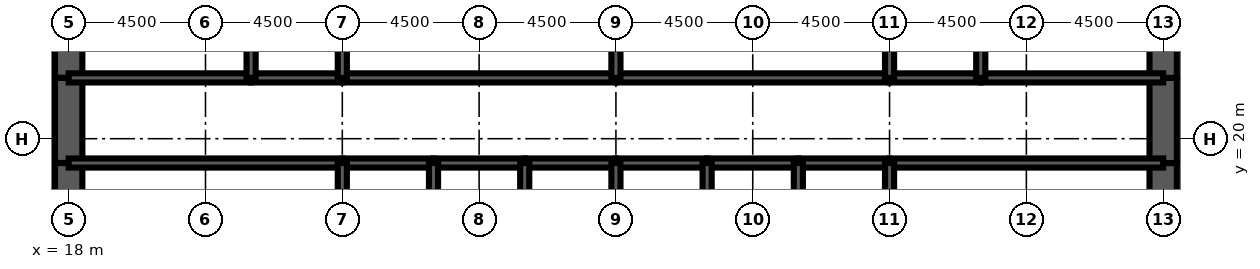
"""IFC4 building model, lengths in metres.
Left out: names, types, materials, properties, quantities, classifications, styles, units other than length and angle.
Written with IfcOpenShell. Run it as: python <this file> out.ifc"""

import sys

from ifc_helpers import new_model, si_unit, direction, frame, frame_2d, origin, place, context, subcontext, project, spatial, rectangle, extrude, element, fill, save


model = new_model("IFC4")
c1 = context("Model", 3, precision=1e-05, world=origin(), true_north=direction((0.0, 1.0)))
c2 = subcontext(c1, "Body", "Model", "MODEL_VIEW")
j1 = project(units=[si_unit("LENGTHUNIT", "METRE"), si_unit("PLANEANGLEUNIT", "RADIAN")], contexts=[c1])
p1 = place(None, origin())
s1 = spatial("IfcSite", under=j1, at=p1, CompositionType="ELEMENT")
p2 = place(p1, origin())
s2 = spatial("IfcBuilding", under=s1, at=p2, CompositionType="ELEMENT")
p3 = place(p2, frame((0.0, 0.0, 59.0)))
s3 = spatial("IfcBuildingStorey", under=s2, at=p3, CompositionType="ELEMENT", Elevation=59.0)
p4 = place(p3, frame((18.0, 26.0, 0.0), z_axis=(0.0, 0.0, 1.0), x_axis=(0.0, -1.0, 0.0)))
e1 = element("IfcWall", 1, at=p4, inside=s3, PredefinedType="SHEAR", context=c2, shape_type="SweptSolid", body=[
    extrude(rectangle(XDim=4.0, YDim=0.9, at=frame_2d((2.0, 0.0))), origin(), (0.0, 0.0, 1.0), 4.5),
])
p5 = place(p3, frame((18.0, 22.0, 0.0), z_axis=(0.0, 0.0, 1.0), x_axis=(0.0, -1.0, 0.0)))
e2 = element("IfcWall", 2, at=p5, inside=s3, PredefinedType="SHEAR", context=c2, shape_type="SweptSolid", body=[
    extrude(rectangle(XDim=2.8, YDim=0.9, at=frame_2d((1.4, 0.0))), origin(), (0.0, 0.0, 1.0), 4.5),
])
p6 = place(p5, frame((0.6, 0.0, 0.0)))
e3 = element("IfcOpeningElement", 3, at=p6, cuts=e2, PredefinedType="OPENING", context=c2, shape_type="SweptSolid", body=[
    extrude(rectangle(XDim=1.8, YDim=2.1, at=frame_2d((0.9, 1.05))), frame((0.0, 0.46, 0.0), z_axis=(0.0, -1.0, 0.0), x_axis=(1.0, 0.0, 0.0)), (0.0, 0.0, 1.0), 0.92),
])
for number, where, z_axis, x_axis in (
    (4, (18.0, 19.2, 0.0), (0.0, 0.0, 1.0), (0.0, -1.0, 0.0)),
    (5, (54.0, 16.0, 0.0), (0.0, 0.0, 1.0), (0.0, 1.0, 0.0)),
):
    element("IfcWall", number, at=place(p3, frame(where, z_axis=z_axis, x_axis=x_axis)), inside=s3, PredefinedType="SHEAR", context=c2, shape_type="SweptSolid", body=[
        extrude(rectangle(XDim=3.2, YDim=0.9, at=frame_2d((1.6, 0.0))), origin(), (0.0, 0.0, 1.0), 4.5),
    ])
p7 = place(p3, frame((54.0, 19.2, 0.0), z_axis=(0.0, 0.0, 1.0), x_axis=(0.0, 1.0, 0.0)))
e6 = element("IfcWall", 6, at=p7, inside=s3, PredefinedType="SHEAR", context=c2, shape_type="SweptSolid", body=[
    extrude(rectangle(XDim=2.8, YDim=0.9, at=frame_2d((1.4, 0.0))), origin(), (0.0, 0.0, 1.0), 4.5),
])
p8 = place(p7, frame((0.4, 0.0, 0.0)))
e7 = element("IfcOpeningElement", 7, at=p8, cuts=e6, PredefinedType="OPENING", context=c2, shape_type="SweptSolid", body=[
    extrude(rectangle(XDim=1.8, YDim=2.1, at=frame_2d((0.9, 1.05))), frame((0.0, 0.46, 0.0), z_axis=(0.0, -1.0, 0.0), x_axis=(1.0, 0.0, 0.0)), (0.0, 0.0, 1.0), 0.92),
])
p9 = place(p3, frame((54.0, 22.0, 0.0), z_axis=(0.0, 0.0, 1.0), x_axis=(0.0, 1.0, 0.0)))
e8 = element("IfcWall", 8, at=p9, inside=s3, PredefinedType="SHEAR", context=c2, shape_type="SweptSolid", body=[
    extrude(rectangle(XDim=4.0, YDim=0.9, at=frame_2d((2.0, 0.0))), origin(), (0.0, 0.0, 1.0), 4.5),
])
p10 = place(p3, frame((18.0, 19.2, 0.0), z_axis=(0.0, 0.0, 1.0), x_axis=(1.0, 0.0, 0.0)))
e9 = element("IfcWall", 9, at=p10, inside=s3, PredefinedType="SOLIDWALL", context=c2, shape_type="SweptSolid", body=[
    extrude(rectangle(XDim=9.0, YDim=0.3, at=frame_2d((4.5, 0.0))), origin(), (0.0, 0.0, 1.0), 4.5),
])
p11 = place(p10, frame((0.65, 0.0, 0.0)))
e10 = element("IfcOpeningElement", 10, at=p11, cuts=e9, PredefinedType="OPENING", context=c2, shape_type="SweptSolid", body=[
    extrude(rectangle(XDim=1.0, YDim=2.1, at=frame_2d((0.5, 1.05))), frame((0.0, 0.16, 0.0), z_axis=(0.0, -1.0, 0.0), x_axis=(1.0, 0.0, 0.0)), (0.0, 0.0, 1.0), 0.32),
])
p12 = place(p3, frame((27.0, 19.2, 0.0), z_axis=(0.0, 0.0, 1.0), x_axis=(1.0, 0.0, 0.0)))
e11 = element("IfcWall", 11, at=p12, inside=s3, PredefinedType="SOLIDWALL", context=c2, shape_type="SweptSolid", body=[
    extrude(rectangle(XDim=3.0, YDim=0.3, at=frame_2d((1.5, 0.0))), origin(), (0.0, 0.0, 1.0), 4.5),
])
p13 = place(p12, frame((0.95, 0.0, 0.0)))
e12 = element("IfcOpeningElement", 12, at=p13, cuts=e11, PredefinedType="OPENING", context=c2, shape_type="SweptSolid", body=[
    extrude(rectangle(XDim=1.1, YDim=2.2, at=frame_2d((0.55, 1.1))), frame((0.0, 0.16, 0.0), z_axis=(0.0, -1.0, 0.0), x_axis=(1.0, 0.0, 0.0)), (0.0, 0.0, 1.0), 0.32),
])
p14 = place(p3, frame((30.0, 19.2, 0.0), z_axis=(0.0, 0.0, 1.0), x_axis=(1.0, 0.0, 0.0)))
e13 = element("IfcWall", 13, at=p14, inside=s3, PredefinedType="SOLIDWALL", context=c2, shape_type="SweptSolid", body=[
    extrude(rectangle(XDim=3.0, YDim=0.3, at=frame_2d((1.5, 0.0))), origin(), (0.0, 0.0, 1.0), 4.5),
])
p15 = place(p14, frame((0.95, 0.0, 0.0)))
e14 = element("IfcOpeningElement", 14, at=p15, cuts=e13, PredefinedType="OPENING", context=c2, shape_type="SweptSolid", body=[
    extrude(rectangle(XDim=1.1, YDim=2.2, at=frame_2d((0.55, 1.1))), frame((0.0, 0.16, 0.0), z_axis=(0.0, -1.0, 0.0), x_axis=(1.0, 0.0, 0.0)), (0.0, 0.0, 1.0), 0.32),
])
p16 = place(p3, frame((33.0, 19.2, 0.0), z_axis=(0.0, 0.0, 1.0), x_axis=(1.0, 0.0, 0.0)))
e15 = element("IfcWall", 15, at=p16, inside=s3, PredefinedType="SOLIDWALL", context=c2, shape_type="SweptSolid", body=[
    extrude(rectangle(XDim=3.0, YDim=0.3, at=frame_2d((1.5, 0.0))), origin(), (0.0, 0.0, 1.0), 4.5),
])
p17 = place(p16, frame((0.95, 0.0, 0.0)))
e16 = element("IfcOpeningElement", 16, at=p17, cuts=e15, PredefinedType="OPENING", context=c2, shape_type="SweptSolid", body=[
    extrude(rectangle(XDim=1.1, YDim=2.2, at=frame_2d((0.55, 1.1))), frame((0.0, 0.16, 0.0), z_axis=(0.0, -1.0, 0.0), x_axis=(1.0, 0.0, 0.0)), (0.0, 0.0, 1.0), 0.32),
])
p18 = place(p3, frame((36.0, 19.2, 0.0), z_axis=(0.0, 0.0, 1.0), x_axis=(1.0, 0.0, 0.0)))
e17 = element("IfcWall", 17, at=p18, inside=s3, PredefinedType="SOLIDWALL", context=c2, shape_type="SweptSolid", body=[
    extrude(rectangle(XDim=3.0, YDim=0.3, at=frame_2d((1.5, 0.0))), origin(), (0.0, 0.0, 1.0), 4.5),
])
p19 = place(p18, frame((0.95, 0.0, 0.0)))
e18 = element("IfcOpeningElement", 18, at=p19, cuts=e17, PredefinedType="OPENING", context=c2, shape_type="SweptSolid", body=[
    extrude(rectangle(XDim=1.1, YDim=2.2, at=frame_2d((0.55, 1.1))), frame((0.0, 0.16, 0.0), z_axis=(0.0, -1.0, 0.0), x_axis=(1.0, 0.0, 0.0)), (0.0, 0.0, 1.0), 0.32),
])
for number, where, z_axis, x_axis in (
    (19, (39.0, 19.2, 0.0), (0.0, 0.0, 1.0), (1.0, 0.0, 0.0)),
    (20, (42.0, 19.2, 0.0), (0.0, 0.0, 1.0), (1.0, 0.0, 0.0)),
):
    element("IfcWall", number, at=place(p3, frame(where, z_axis=z_axis, x_axis=x_axis)), inside=s3, PredefinedType="SOLIDWALL", context=c2, shape_type="SweptSolid", body=[
        extrude(rectangle(XDim=3.0, YDim=0.3, at=frame_2d((1.5, 0.0))), origin(), (0.0, 0.0, 1.0), 4.5),
    ])
p20 = place(p3, frame((45.0, 19.2, 0.0), z_axis=(0.0, 0.0, 1.0), x_axis=(1.0, 0.0, 0.0)))
e21 = element("IfcWall", 21, at=p20, inside=s3, PredefinedType="SOLIDWALL", context=c2, shape_type="SweptSolid", body=[
    extrude(rectangle(XDim=9.0, YDim=0.3, at=frame_2d((4.5, 0.0))), origin(), (0.0, 0.0, 1.0), 4.5),
])
p21 = place(p20, frame((7.35, 0.0, 0.0)))
e22 = element("IfcOpeningElement", 22, at=p21, cuts=e21, PredefinedType="OPENING", context=c2, shape_type="SweptSolid", body=[
    extrude(rectangle(XDim=1.0, YDim=2.1, at=frame_2d((0.5, 1.05))), frame((0.0, 0.16, 0.0), z_axis=(0.0, -1.0, 0.0), x_axis=(1.0, 0.0, 0.0)), (0.0, 0.0, 1.0), 0.32),
])
p22 = place(p3, frame((18.0, 22.0, 0.0), z_axis=(0.0, 0.0, 1.0), x_axis=(1.0, 0.0, 0.0)))
e23 = element("IfcWall", 23, at=p22, inside=s3, PredefinedType="SOLIDWALL", context=c2, shape_type="SweptSolid", body=[
    extrude(rectangle(XDim=6.0, YDim=0.3, at=frame_2d((3.0, 0.0))), origin(), (0.0, 0.0, 1.0), 4.5),
])
p23 = place(p22, frame((4.4, 0.0, 0.0)))
e24 = element("IfcOpeningElement", 24, at=p23, cuts=e23, PredefinedType="OPENING", context=c2, shape_type="SweptSolid", body=[
    extrude(rectangle(XDim=1.0, YDim=2.1, at=frame_2d((0.5, 1.05))), frame((0.0, 0.16, 0.0), z_axis=(0.0, -1.0, 0.0), x_axis=(1.0, 0.0, 0.0)), (0.0, 0.0, 1.0), 0.32),
])
p24 = place(p22, frame((1.0, 0.0, 0.0)))
e25 = element("IfcOpeningElement", 25, at=p24, cuts=e23, PredefinedType="OPENING", context=c2, shape_type="SweptSolid", body=[
    extrude(rectangle(XDim=1.0, YDim=2.1, at=frame_2d((0.5, 1.05))), frame((0.0, 0.16, 0.0), z_axis=(0.0, -1.0, 0.0), x_axis=(1.0, 0.0, 0.0)), (0.0, 0.0, 1.0), 0.32),
])
p25 = place(p3, frame((24.0, 22.0, 0.0), z_axis=(0.0, 0.0, 1.0), x_axis=(1.0, 0.0, 0.0)))
e26 = element("IfcWall", 26, at=p25, inside=s3, PredefinedType="SOLIDWALL", context=c2, shape_type="SweptSolid", body=[
    extrude(rectangle(XDim=3.0, YDim=0.3, at=frame_2d((1.5, 0.0))), origin(), (0.0, 0.0, 1.0), 4.5),
])
p26 = place(p25, frame((1.0, 0.0, 0.0)))
e27 = element("IfcOpeningElement", 27, at=p26, cuts=e26, PredefinedType="OPENING", context=c2, shape_type="SweptSolid", body=[
    extrude(rectangle(XDim=1.0, YDim=2.1, at=frame_2d((0.5, 1.05))), frame((0.0, 0.16, 0.0), z_axis=(0.0, -1.0, 0.0), x_axis=(1.0, 0.0, 0.0)), (0.0, 0.0, 1.0), 0.32),
])
p27 = place(p3, frame((27.0, 22.0, 0.0), z_axis=(0.0, 0.0, 1.0), x_axis=(1.0, 0.0, 0.0)))
e28 = element("IfcWall", 28, at=p27, inside=s3, PredefinedType="SOLIDWALL", context=c2, shape_type="SweptSolid", body=[
    extrude(rectangle(XDim=9.0, YDim=0.3, at=frame_2d((4.5, 0.0))), origin(), (0.0, 0.0, 1.0), 4.5),
])
p28 = place(p27, frame((4.0, 0.0, 0.0)))
e29 = element("IfcOpeningElement", 29, at=p28, cuts=e28, PredefinedType="OPENING", context=c2, shape_type="SweptSolid", body=[
    extrude(rectangle(XDim=1.0, YDim=2.1, at=frame_2d((0.5, 1.05))), frame((0.0, 0.16, 0.0), z_axis=(0.0, -1.0, 0.0), x_axis=(1.0, 0.0, 0.0)), (0.0, 0.0, 1.0), 0.32),
])
p29 = place(p3, frame((36.0, 22.0, 0.0), z_axis=(0.0, 0.0, 1.0), x_axis=(1.0, 0.0, 0.0)))
e30 = element("IfcWall", 30, at=p29, inside=s3, PredefinedType="SOLIDWALL", context=c2, shape_type="SweptSolid", body=[
    extrude(rectangle(XDim=9.0, YDim=0.3, at=frame_2d((4.5, 0.0))), origin(), (0.0, 0.0, 1.0), 4.5),
])
p30 = place(p29, frame((4.0, 0.0, 0.0)))
e31 = element("IfcOpeningElement", 31, at=p30, cuts=e30, PredefinedType="OPENING", context=c2, shape_type="SweptSolid", body=[
    extrude(rectangle(XDim=1.0, YDim=2.1, at=frame_2d((0.5, 1.05))), frame((0.0, 0.16, 0.0), z_axis=(0.0, -1.0, 0.0), x_axis=(1.0, 0.0, 0.0)), (0.0, 0.0, 1.0), 0.32),
])
p31 = place(p3, frame((45.0, 22.0, 0.0), z_axis=(0.0, 0.0, 1.0), x_axis=(1.0, 0.0, 0.0)))
e32 = element("IfcWall", 32, at=p31, inside=s3, PredefinedType="SOLIDWALL", context=c2, shape_type="SweptSolid", body=[
    extrude(rectangle(XDim=3.0, YDim=0.3, at=frame_2d((1.5, 0.0))), origin(), (0.0, 0.0, 1.0), 4.5),
])
p32 = place(p31, frame((1.0, 0.0, 0.0)))
e33 = element("IfcOpeningElement", 33, at=p32, cuts=e32, PredefinedType="OPENING", context=c2, shape_type="SweptSolid", body=[
    extrude(rectangle(XDim=1.0, YDim=2.1, at=frame_2d((0.5, 1.05))), frame((0.0, 0.16, 0.0), z_axis=(0.0, -1.0, 0.0), x_axis=(1.0, 0.0, 0.0)), (0.0, 0.0, 1.0), 0.32),
])
p33 = place(p3, frame((48.0, 22.0, 0.0), z_axis=(0.0, 0.0, 1.0), x_axis=(1.0, 0.0, 0.0)))
e34 = element("IfcWall", 34, at=p33, inside=s3, PredefinedType="SOLIDWALL", context=c2, shape_type="SweptSolid", body=[
    extrude(rectangle(XDim=6.0, YDim=0.3, at=frame_2d((3.0, 0.0))), origin(), (0.0, 0.0, 1.0), 4.5),
])
p34 = place(p33, frame((2.0, 0.0, 0.0)))
e35 = element("IfcOpeningElement", 35, at=p34, cuts=e34, PredefinedType="OPENING", context=c2, shape_type="SweptSolid", body=[
    extrude(rectangle(XDim=1.0, YDim=2.1, at=frame_2d((0.5, 1.05))), frame((0.0, 0.16, 0.0), z_axis=(0.0, -1.0, 0.0), x_axis=(1.0, 0.0, 0.0)), (0.0, 0.0, 1.0), 0.32),
])
p35 = place(p33, frame((4.15, 0.0, 0.0)))
e36 = element("IfcOpeningElement", 36, at=p35, cuts=e34, PredefinedType="OPENING", context=c2, shape_type="SweptSolid", body=[
    extrude(rectangle(XDim=1.0, YDim=2.1, at=frame_2d((0.5, 1.05))), frame((0.0, 0.16, 0.0), z_axis=(0.0, -1.0, 0.0), x_axis=(1.0, 0.0, 0.0)), (0.0, 0.0, 1.0), 0.32),
])
for number, where, z_axis, x_axis in (
    (37, (27.0, 16.0, 0.0), (0.0, 0.0, 1.0), (0.0, 1.0, 0.0)),
    (38, (30.0, 16.0, 0.0), (0.0, 0.0, 1.0), (0.0, 1.0, 0.0)),
    (39, (33.0, 16.0, 0.0), (0.0, 0.0, 1.0), (0.0, 1.0, 0.0)),
    (40, (36.0, 16.0, 0.0), (0.0, 0.0, 1.0), (0.0, 1.0, 0.0)),
    (41, (39.0, 16.0, 0.0), (0.0, 0.0, 1.0), (0.0, 1.0, 0.0)),
    (42, (42.0, 16.0, 0.0), (0.0, 0.0, 1.0), (0.0, 1.0, 0.0)),
    (43, (45.0, 16.0, 0.0), (0.0, 0.0, 1.0), (0.0, 1.0, 0.0)),
):
    element("IfcWall", number, at=place(p3, frame(where, z_axis=z_axis, x_axis=x_axis)), inside=s3, PredefinedType="SOLIDWALL", context=c2, shape_type="SweptSolid", body=[
        extrude(rectangle(XDim=3.2, YDim=0.3, at=frame_2d((1.6, 0.0))), origin(), (0.0, 0.0, 1.0), 4.5),
    ])
for number, where, z_axis, x_axis in (
    (44, (24.0, 22.0, 0.0), (0.0, 0.0, 1.0), (0.0, 1.0, 0.0)),
    (45, (27.0, 22.0, 0.0), (0.0, 0.0, 1.0), (0.0, 1.0, 0.0)),
    (46, (36.0, 22.0, 0.0), (0.0, 0.0, 1.0), (0.0, 1.0, 0.0)),
    (47, (45.0, 22.0, 0.0), (0.0, 0.0, 1.0), (0.0, 1.0, 0.0)),
    (48, (48.0, 22.0, 0.0), (0.0, 0.0, 1.0), (0.0, 1.0, 0.0)),
):
    element("IfcWall", number, at=place(p3, frame(where, z_axis=z_axis, x_axis=x_axis)), inside=s3, PredefinedType="SOLIDWALL", context=c2, shape_type="SweptSolid", body=[
        extrude(rectangle(XDim=4.0, YDim=0.3, at=frame_2d((2.0, 0.0))), origin(), (0.0, 0.0, 1.0), 4.5),
    ])
p36 = place(p3, frame((39.0, 22.15, 0.0), z_axis=(0.0, 0.0, 1.0), x_axis=(0.0, 1.0, 0.0)))
e49 = element("IfcWall", 49, at=p36, inside=s3, PredefinedType="PARTITIONING", context=c2, shape_type="SweptSolid", body=[
    extrude(rectangle(XDim=3.7, YDim=0.15, at=frame_2d((1.85, 0.0))), origin(), (0.0, 0.0, 1.0), 3.0),
])
p37 = place(p36, frame((2.2, 0.0, 0.0)))
e50 = element("IfcOpeningElement", 50, at=p37, cuts=e49, PredefinedType="OPENING", context=c2, shape_type="SweptSolid", body=[
    extrude(rectangle(XDim=1.0, YDim=2.1, at=frame_2d((0.5, 1.05))), frame((0.0, 0.085, 0.0), z_axis=(0.0, -1.0, 0.0), x_axis=(1.0, 0.0, 0.0)), (0.0, 0.0, 1.0), 0.17),
])
for number, where, z_axis, x_axis in (
    (51, (20.625, 22.15, 0.0), (0.0, 0.0, 1.0), (0.0, 1.0, 0.0)),
    (52, (51.675, 22.15, 0.0), (0.0, 0.0, 1.0), (0.0, 1.0, 0.0)),
):
    element("IfcWall", number, at=place(p3, frame(where, z_axis=z_axis, x_axis=x_axis)), inside=s3, PredefinedType="PARTITIONING", context=c2, shape_type="SweptSolid", body=[
        extrude(rectangle(XDim=3.7, YDim=0.15, at=frame_2d((1.85, 0.0))), origin(), (0.0, 0.0, 1.0), 3.0),
    ])
p38 = place(p13, origin())
e53 = element("IfcDoor", 53, at=p38, inside=s3, OperationType="DOUBLE_DOOR_SLIDING", PredefinedType="USERDEFINED", context=c2, shape_type="SweptSolid", body=[
    extrude(rectangle(XDim=1.1, YDim=2.2, at=frame_2d((0.55, 1.1))), frame((0.0, 0.025, 0.0), z_axis=(0.0, -1.0, 0.0), x_axis=(1.0, 0.0, 0.0)), (0.0, 0.0, 1.0), 0.05),
])
fill(e12, e53)
p39 = place(p15, origin())
e54 = element("IfcDoor", 54, at=p39, inside=s3, OperationType="DOUBLE_DOOR_SLIDING", PredefinedType="USERDEFINED", context=c2, shape_type="SweptSolid", body=[
    extrude(rectangle(XDim=1.1, YDim=2.2, at=frame_2d((0.55, 1.1))), frame((0.0, 0.025, 0.0), z_axis=(0.0, -1.0, 0.0), x_axis=(1.0, 0.0, 0.0)), (0.0, 0.0, 1.0), 0.05),
])
fill(e14, e54)
p40 = place(p17, origin())
e55 = element("IfcDoor", 55, at=p40, inside=s3, OperationType="DOUBLE_DOOR_SLIDING", PredefinedType="USERDEFINED", context=c2, shape_type="SweptSolid", body=[
    extrude(rectangle(XDim=1.1, YDim=2.2, at=frame_2d((0.55, 1.1))), frame((0.0, 0.025, 0.0), z_axis=(0.0, -1.0, 0.0), x_axis=(1.0, 0.0, 0.0)), (0.0, 0.0, 1.0), 0.05),
])
fill(e16, e55)
p41 = place(p19, origin())
e56 = element("IfcDoor", 56, at=p41, inside=s3, OperationType="DOUBLE_DOOR_SLIDING", PredefinedType="USERDEFINED", context=c2, shape_type="SweptSolid", body=[
    extrude(rectangle(XDim=1.1, YDim=2.2, at=frame_2d((0.55, 1.1))), frame((0.0, 0.025, 0.0), z_axis=(0.0, -1.0, 0.0), x_axis=(1.0, 0.0, 0.0)), (0.0, 0.0, 1.0), 0.05),
])
fill(e18, e56)
p42 = place(p11, origin())
e57 = element("IfcDoor", 57, at=p42, inside=s3, OperationType="SINGLE_SWING_LEFT", PredefinedType="DOOR", context=c2, shape_type="SweptSolid", body=[
    extrude(rectangle(XDim=1.0, YDim=2.1, at=frame_2d((0.5, 1.05))), frame((0.0, 0.025, 0.0), z_axis=(0.0, -1.0, 0.0), x_axis=(1.0, 0.0, 0.0)), (0.0, 0.0, 1.0), 0.05),
])
fill(e10, e57)
p43 = place(p21, origin())
e58 = element("IfcDoor", 58, at=p43, inside=s3, OperationType="SINGLE_SWING_RIGHT", PredefinedType="DOOR", context=c2, shape_type="SweptSolid", body=[
    extrude(rectangle(XDim=1.0, YDim=2.1, at=frame_2d((0.5, 1.05))), frame((0.0, 0.025, 0.0), z_axis=(0.0, -1.0, 0.0), x_axis=(1.0, 0.0, 0.0)), (0.0, 0.0, 1.0), 0.05),
])
fill(e22, e58)
p44 = place(p6, origin())
e59 = element("IfcDoor", 59, at=p44, inside=s3, OperationType="SINGLE_SWING_LEFT", PredefinedType="DOOR", context=c2, shape_type="SweptSolid", body=[
    extrude(rectangle(XDim=1.8, YDim=2.1, at=frame_2d((0.9, 1.05))), frame((0.0, 0.45, 0.0), z_axis=(0.0, -1.0, 0.0), x_axis=(1.0, 0.0, 0.0)), (0.0, 0.0, 1.0), 0.899),
])
fill(e3, e59)
p45 = place(p8, origin())
e60 = element("IfcDoor", 60, at=p45, inside=s3, OperationType="SINGLE_SWING_LEFT", PredefinedType="DOOR", context=c2, shape_type="SweptSolid", body=[
    extrude(rectangle(XDim=1.8, YDim=2.1, at=frame_2d((0.9, 1.05))), frame((0.0, 0.45, 0.0), z_axis=(0.0, -1.0, 0.0), x_axis=(1.0, 0.0, 0.0)), (0.0, 0.0, 1.0), 0.899),
])
fill(e7, e60)
p46 = place(p23, origin())
e61 = element("IfcDoor", 61, at=p46, inside=s3, OperationType="SINGLE_SWING_RIGHT", PredefinedType="DOOR", context=c2, shape_type="SweptSolid", body=[
    extrude(rectangle(XDim=1.0, YDim=2.1, at=frame_2d((0.5, 1.05))), frame((0.0, 0.025, 0.0), z_axis=(0.0, -1.0, 0.0), x_axis=(1.0, 0.0, 0.0)), (0.0, 0.0, 1.0), 0.05),
])
fill(e24, e61)
p47 = place(p26, origin())
e62 = element("IfcDoor", 62, at=p47, inside=s3, OperationType="SINGLE_SWING_LEFT", PredefinedType="DOOR", context=c2, shape_type="SweptSolid", body=[
    extrude(rectangle(XDim=1.0, YDim=2.1, at=frame_2d((0.5, 1.05))), frame((0.0, 0.025, 0.0), z_axis=(0.0, -1.0, 0.0), x_axis=(1.0, 0.0, 0.0)), (0.0, 0.0, 1.0), 0.05),
])
fill(e27, e62)
p48 = place(p28, origin())
e63 = element("IfcDoor", 63, at=p48, inside=s3, OperationType="SINGLE_SWING_LEFT", PredefinedType="DOOR", context=c2, shape_type="SweptSolid", body=[
    extrude(rectangle(XDim=1.0, YDim=2.1, at=frame_2d((0.5, 1.05))), frame((0.0, 0.025, 0.0), z_axis=(0.0, -1.0, 0.0), x_axis=(1.0, 0.0, 0.0)), (0.0, 0.0, 1.0), 0.05),
])
fill(e29, e63)
p49 = place(p30, origin())
e64 = element("IfcDoor", 64, at=p49, inside=s3, OperationType="SINGLE_SWING_LEFT", PredefinedType="DOOR", context=c2, shape_type="SweptSolid", body=[
    extrude(rectangle(XDim=1.0, YDim=2.1, at=frame_2d((0.5, 1.05))), frame((0.0, 0.025, 0.0), z_axis=(0.0, -1.0, 0.0), x_axis=(1.0, 0.0, 0.0)), (0.0, 0.0, 1.0), 0.05),
])
fill(e31, e64)
p50 = place(p32, origin())
e65 = element("IfcDoor", 65, at=p50, inside=s3, OperationType="SINGLE_SWING_LEFT", PredefinedType="DOOR", context=c2, shape_type="SweptSolid", body=[
    extrude(rectangle(XDim=1.0, YDim=2.1, at=frame_2d((0.5, 1.05))), frame((0.0, 0.025, 0.0), z_axis=(0.0, -1.0, 0.0), x_axis=(1.0, 0.0, 0.0)), (0.0, 0.0, 1.0), 0.05),
])
fill(e33, e65)
p51 = place(p34, origin())
e66 = element("IfcDoor", 66, at=p51, inside=s3, OperationType="SINGLE_SWING_LEFT", PredefinedType="DOOR", context=c2, shape_type="SweptSolid", body=[
    extrude(rectangle(XDim=1.0, YDim=2.1, at=frame_2d((0.5, 1.05))), frame((0.0, 0.025, 0.0), z_axis=(0.0, -1.0, 0.0), x_axis=(1.0, 0.0, 0.0)), (0.0, 0.0, 1.0), 0.05),
])
fill(e35, e66)
p52 = place(p24, origin())
e67 = element("IfcDoor", 67, at=p52, inside=s3, OperationType="SINGLE_SWING_LEFT", PredefinedType="DOOR", context=c2, shape_type="SweptSolid", body=[
    extrude(rectangle(XDim=1.0, YDim=2.1, at=frame_2d((0.5, 1.05))), frame((0.0, 0.025, 0.0), z_axis=(0.0, -1.0, 0.0), x_axis=(1.0, 0.0, 0.0)), (0.0, 0.0, 1.0), 0.05),
])
fill(e25, e67)
p53 = place(p35, origin())
e68 = element("IfcDoor", 68, at=p53, inside=s3, OperationType="SINGLE_SWING_RIGHT", PredefinedType="DOOR", context=c2, shape_type="SweptSolid", body=[
    extrude(rectangle(XDim=1.0, YDim=2.1, at=frame_2d((0.5, 1.05))), frame((0.0, 0.025, 0.0), z_axis=(0.0, -1.0, 0.0), x_axis=(1.0, 0.0, 0.0)), (0.0, 0.0, 1.0), 0.05),
])
fill(e36, e68)
save(model, sys.argv[1])
